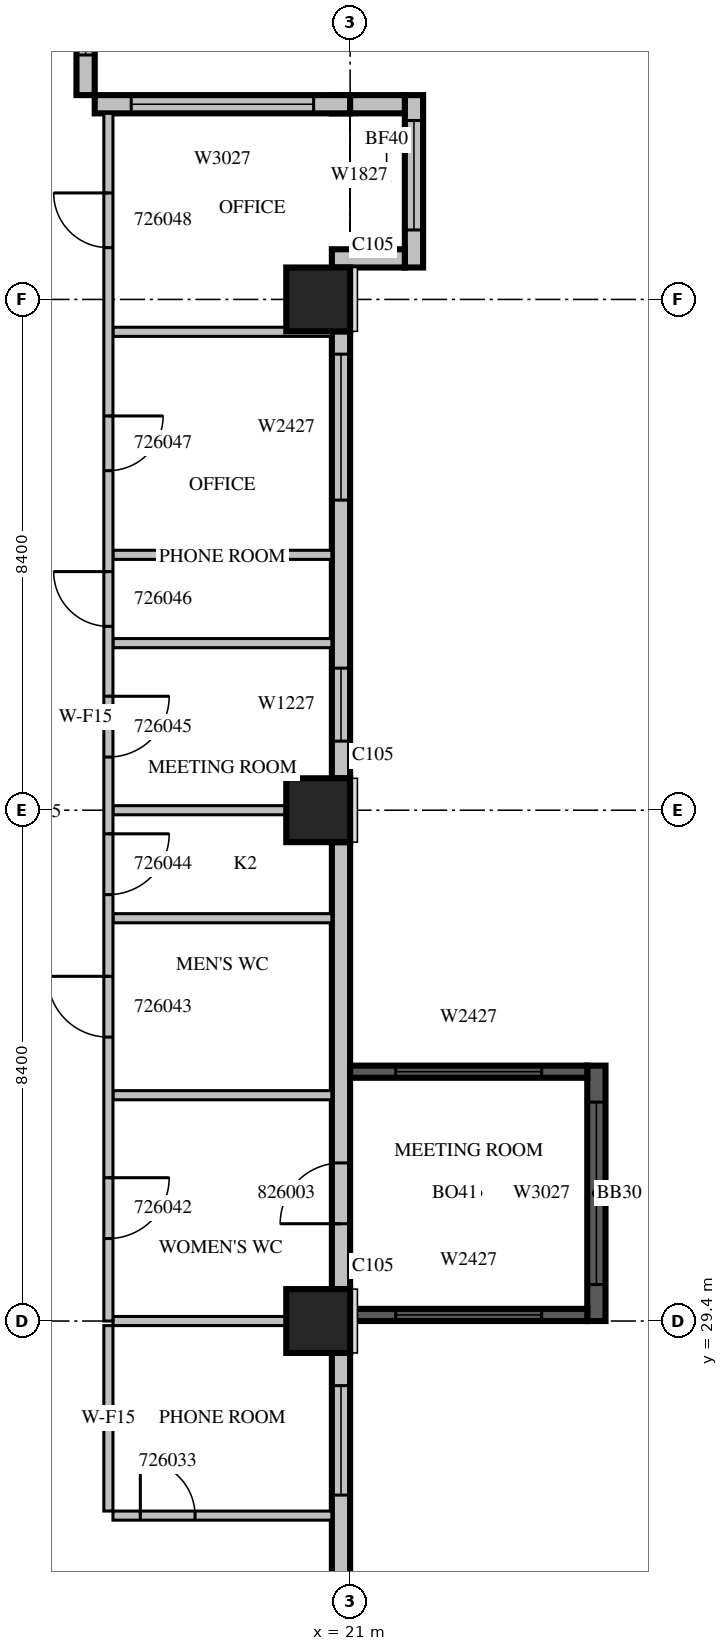
"""IFC4 building model, lengths in metres.
Left out: names, types, materials, properties, quantities, classifications, styles, units other than length and angle.
Written with IfcOpenShell. Run it as: python <this file> out.ifc"""

import sys

from ifc_helpers import new_model, si_unit, direction, frame, frame_2d, origin, origin_2d, place, context, subcontext, project, spatial, rectangle, extrude, source, transform, mapped, element, fill, save


model = new_model("IFC4")
c1 = context("Model", 3, precision=1e-05, world=origin(), true_north=direction((0.0, 1.0)))
c2 = subcontext(c1, "Body", "Model", "MODEL_VIEW")
j1 = project(units=[si_unit("LENGTHUNIT", "METRE"), si_unit("PLANEANGLEUNIT", "RADIAN")], contexts=[c1])
p1 = place(None, origin())
s1 = spatial("IfcSite", under=j1, at=p1, CompositionType="ELEMENT")
p2 = place(p1, origin())
s2 = spatial("IfcBuilding", under=s1, at=p2, CompositionType="ELEMENT")
p3 = place(p2, frame((0.0, 0.0, 120.3)))
s3 = spatial("IfcBuildingStorey", under=s2, at=p3, CompositionType="ELEMENT", Elevation=120.3)
m1 = source(origin(), c2, "Body", "SweptSolid", [
    extrude(rectangle(XDim=1.05, YDim=1.05, at=origin_2d()), origin(), (0.0, 0.0, 1.0), 4.2),
])
for number, where, z_axis, x_axis in (
    (1, (20.475, 29.4, 0.0), (0.0, 0.0, 1.0), (1.0, 0.0, 0.0)),
    (2, (20.475, 37.8, 0.0), (0.0, 0.0, 1.0), (1.0, 0.0, 0.0)),
    (3, (20.475, 46.2, 0.0), (0.0, 0.0, 1.0), (1.0, 0.0, 0.0)),
):
    element("IfcColumn", number, at=place(p3, frame(where, z_axis=z_axis, x_axis=x_axis)), inside=s3, PredefinedType="COLUMN", context=c2, shape_type="MappedRepresentation", body=[
        mapped(m1, transform((0.0, 0.0, 0.0), scale=1.0)),
    ])
m2 = source(origin(), c2, "Body", "SweptSolid", [
    extrude(rectangle(XDim=6.875, YDim=0.3, at=frame_2d((3.438, 0.0))), origin(), (0.0, 0.0, 1.0), 3.8),
])
p4 = place(p3, frame((20.85, 22.0, 0.0), z_axis=(0.0, 0.0, 1.0), x_axis=(0.0, 1.0, 0.0)))
e4 = element("IfcWall", 4, at=p4, inside=s3, PredefinedType="STANDARD", context=c2, shape_type="MappedRepresentation", body=[
    mapped(m2, transform((0.0, 0.0, 0.0), scale=1.0)),
])
m3 = source(origin(), c2, "Body", "SweptSolid", [
    extrude(rectangle(XDim=1.8, YDim=2.7, at=frame_2d((0.9, 1.35))), frame((0.0, 0.16, 0.0), z_axis=(0.0, -1.0, 0.0), x_axis=(1.0, 0.0, 0.0)), (0.0, 0.0, 1.0), 0.32),
])
p5 = place(p4, frame((0.2, 0.0, 0.6)))
e5 = element("IfcOpeningElement", 5, at=p5, cuts=e4, PredefinedType="OPENING", context=c2, shape_type="MappedRepresentation", body=[
    mapped(m3, transform((0.0, 0.0, 0.0), scale=1.0)),
])
p6 = place(p4, frame((4.537, 0.0, 0.6)))
e6 = element("IfcOpeningElement", 6, at=p6, cuts=e4, PredefinedType="OPENING", context=c2, shape_type="MappedRepresentation", body=[
    mapped(m3, transform((0.0, 0.0, 0.0), scale=1.0)),
])
m4 = source(origin(), c2, "Body", "SweptSolid", [
    extrude(rectangle(XDim=7.35, YDim=0.3, at=frame_2d((3.675, 0.0))), origin(), (0.0, 0.0, 1.0), 3.8),
])
p7 = place(p3, frame((20.85, 29.925, 0.0), z_axis=(0.0, 0.0, 1.0), x_axis=(0.0, 1.0, 0.0)))
e7 = element("IfcWall", 7, at=p7, inside=s3, PredefinedType="STANDARD", context=c2, shape_type="MappedRepresentation", body=[
    mapped(m4, transform((0.0, 0.0, 0.0), scale=1.0)),
])
m5 = source(origin(), c2, "Body", "SweptSolid", [
    extrude(rectangle(XDim=1.0, YDim=2.1, at=frame_2d((0.5, 1.05))), frame((0.0, 0.16, 0.0), z_axis=(0.0, -1.0, 0.0), x_axis=(1.0, 0.0, 0.0)), (0.0, 0.0, 1.0), 0.32),
])
p8 = place(p7, frame((1.075, 0.0, 0.0)))
e8 = element("IfcOpeningElement", 8, at=p8, cuts=e7, PredefinedType="OPENING", context=c2, shape_type="MappedRepresentation", body=[
    mapped(m5, transform((0.0, 0.0, 0.0), scale=1.0)),
])
p9 = place(p3, frame((20.85, 38.325, 0.0), z_axis=(0.0, 0.0, 1.0), x_axis=(0.0, 1.0, 0.0)))
e9 = element("IfcWall", 9, at=p9, inside=s3, PredefinedType="STANDARD", context=c2, shape_type="MappedRepresentation", body=[
    mapped(m4, transform((0.0, 0.0, 0.0), scale=1.0)),
])
m6 = source(origin(), c2, "Body", "SweptSolid", [
    extrude(rectangle(XDim=1.2, YDim=2.7, at=frame_2d((0.6, 1.35))), frame((0.0, 0.16, 0.0), z_axis=(0.0, -1.0, 0.0), x_axis=(1.0, 0.0, 0.0)), (0.0, 0.0, 1.0), 0.32),
])
p10 = place(p9, frame((0.612, 0.0, 0.6)))
e10 = element("IfcOpeningElement", 10, at=p10, cuts=e9, PredefinedType="OPENING", context=c2, shape_type="MappedRepresentation", body=[
    mapped(m6, transform((0.0, 0.0, 0.0), scale=1.0)),
])
m7 = source(origin(), c2, "Body", "SweptSolid", [
    extrude(rectangle(XDim=2.4, YDim=2.7, at=frame_2d((1.2, 1.35))), frame((0.0, 0.16, 0.0), z_axis=(0.0, -1.0, 0.0), x_axis=(1.0, 0.0, 0.0)), (0.0, 0.0, 1.0), 0.32),
])
p11 = place(p9, frame((4.575, 0.0, 0.6)))
e11 = element("IfcOpeningElement", 11, at=p11, cuts=e9, PredefinedType="OPENING", context=c2, shape_type="MappedRepresentation", body=[
    mapped(m7, transform((0.0, 0.0, 0.0), scale=1.0)),
])
m8 = source(origin(), c2, "Body", "SweptSolid", [
    extrude(rectangle(XDim=2.835, YDim=0.3, at=frame_2d((1.417, 0.0))), origin(), (0.0, 0.0, 1.0), 3.8),
])
p12 = place(p3, frame((22.05, 46.725, 0.0), z_axis=(0.0, 0.0, 1.0), x_axis=(0.0, 1.0, 0.0)))
e12 = element("IfcWall", 12, at=p12, inside=s3, PredefinedType="STANDARD", context=c2, shape_type="MappedRepresentation", body=[
    mapped(m8, transform((0.0, 0.0, 0.0), scale=1.0)),
])
p13 = place(p12, frame((0.618, 0.0, 0.6)))
e13 = element("IfcOpeningElement", 13, at=p13, cuts=e12, PredefinedType="OPENING", context=c2, shape_type="MappedRepresentation", body=[
    mapped(m3, transform((0.0, 0.0, 0.0), scale=1.0)),
])
m9 = source(origin(), c2, "Body", "SweptSolid", [
    extrude(rectangle(XDim=1.2, YDim=0.3, at=frame_2d((0.6, 0.0))), origin(), (0.0, 0.0, 1.0), 3.8),
])
for number, where, z_axis, x_axis in (
    (14, (20.7, 46.875, 0.0), (0.0, 0.0, 1.0), (1.0, 0.0, 0.0)),
    (15, (20.7, 49.41, 0.0), (0.0, 0.0, 1.0), (1.0, 0.0, 0.0)),
):
    element("IfcWall", number, at=place(p3, frame(where, z_axis=z_axis, x_axis=x_axis)), inside=s3, PredefinedType="STANDARD", context=c2, shape_type="MappedRepresentation", body=[
        mapped(m9, transform((0.0, 0.0, 0.0), scale=1.0)),
    ])
m10 = source(origin(), c2, "Body", "SweptSolid", [
    extrude(rectangle(XDim=4.2, YDim=0.3, at=frame_2d((2.1, 0.0))), origin(), (0.0, 0.0, 1.0), 3.8),
])
p14 = place(p3, frame((21.0, 49.41, 0.0), z_axis=(0.0, 0.0, 1.0), x_axis=(-1.0, 0.0, 0.0)))
e16 = element("IfcWall", 16, at=p14, inside=s3, PredefinedType="STANDARD", context=c2, shape_type="MappedRepresentation", body=[
    mapped(m10, transform((0.0, 0.0, 0.0), scale=1.0)),
])
m11 = source(origin(), c2, "Body", "SweptSolid", [
    extrude(rectangle(XDim=3.0, YDim=2.7, at=frame_2d((1.5, 1.35))), frame((0.0, 0.16, 0.0), z_axis=(0.0, -1.0, 0.0), x_axis=(1.0, 0.0, 0.0)), (0.0, 0.0, 1.0), 0.32),
])
p15 = place(p14, frame((0.6, 0.0, 0.6)))
e17 = element("IfcOpeningElement", 17, at=p15, cuts=e16, PredefinedType="OPENING", context=c2, shape_type="MappedRepresentation", body=[
    mapped(m11, transform((0.0, 0.0, 0.0), scale=1.0)),
])
m12 = source(origin(), c2, "Body", "SweptSolid", [
    extrude(rectangle(XDim=2.52, YDim=0.3, at=frame_2d((1.26, 0.0))), origin(), (0.0, 0.0, 1.0), 3.8),
])
p16 = place(p3, frame((16.65, 49.56, 0.0), z_axis=(0.0, 0.0, 1.0), x_axis=(0.0, 1.0, 0.0)))
e18 = element("IfcWall", 18, at=p16, inside=s3, PredefinedType="STANDARD", context=c2, shape_type="MappedRepresentation", body=[
    mapped(m12, transform((0.0, 0.0, 0.0), scale=1.0)),
])
p17 = place(p16, frame((0.66, 0.0, 0.6)))
e19 = element("IfcOpeningElement", 19, at=p17, cuts=e18, PredefinedType="OPENING", context=c2, shape_type="MappedRepresentation", body=[
    mapped(m6, transform((0.0, 0.0, 0.0), scale=1.0)),
])
m13 = source(origin(), c2, "Body", "SweptSolid", [
    extrude(rectangle(XDim=4.2, YDim=0.3, at=frame_2d((2.1, 0.0))), origin(), (0.0, 0.0, 1.0), 3.79),
])
p18 = place(p3, frame((25.05, 29.4, 0.0), z_axis=(0.0, 0.0, 1.0), x_axis=(0.0, 1.0, 0.0)))
e20 = element("IfcWall", 20, at=p18, inside=s3, PredefinedType="SOLIDWALL", context=c2, shape_type="MappedRepresentation", body=[
    mapped(m13, transform((0.0, 0.0, 0.0), scale=1.0)),
])
p19 = place(p18, frame((0.6, 0.0, 0.6)))
e21 = element("IfcOpeningElement", 21, at=p19, cuts=e20, PredefinedType="OPENING", context=c2, shape_type="MappedRepresentation", body=[
    mapped(m11, transform((0.0, 0.0, 0.0), scale=1.0)),
])
m14 = source(origin(), c2, "Body", "SweptSolid", [
    extrude(rectangle(XDim=3.9, YDim=0.2, at=frame_2d((1.95, 0.0))), origin(), (0.0, 0.0, 1.0), 3.79),
])
p20 = place(p3, frame((21.0, 29.5, 0.0), z_axis=(0.0, 0.0, 1.0), x_axis=(1.0, 0.0, 0.0)))
e22 = element("IfcWall", 22, at=p20, inside=s3, PredefinedType="SOLIDWALL", context=c2, shape_type="MappedRepresentation", body=[
    mapped(m14, transform((0.0, 0.0, 0.0), scale=1.0)),
])
m15 = source(origin(), c2, "Body", "SweptSolid", [
    extrude(rectangle(XDim=2.4, YDim=2.7, at=frame_2d((1.2, 1.35))), frame((0.0, 0.11, 0.0), z_axis=(0.0, -1.0, 0.0), x_axis=(1.0, 0.0, 0.0)), (0.0, 0.0, 1.0), 0.22),
])
p21 = place(p20, frame((0.75, 0.0, 0.6)))
e23 = element("IfcOpeningElement", 23, at=p21, cuts=e22, PredefinedType="OPENING", context=c2, shape_type="MappedRepresentation", body=[
    mapped(m15, transform((0.0, 0.0, 0.0), scale=1.0)),
])
p22 = place(p3, frame((21.0, 33.5, 0.0), z_axis=(0.0, 0.0, 1.0), x_axis=(1.0, 0.0, 0.0)))
e24 = element("IfcWall", 24, at=p22, inside=s3, PredefinedType="SOLIDWALL", context=c2, shape_type="MappedRepresentation", body=[
    mapped(m14, transform((0.0, 0.0, 0.0), scale=1.0)),
])
p23 = place(p22, frame((0.75, 0.0, 0.6)))
e25 = element("IfcOpeningElement", 25, at=p23, cuts=e24, PredefinedType="OPENING", context=c2, shape_type="MappedRepresentation", body=[
    mapped(m15, transform((0.0, 0.0, 0.0), scale=1.0)),
])
m16 = source(origin(), c2, "Body", "SweptSolid", [
    extrude(rectangle(XDim=3.6, YDim=0.15, at=frame_2d((1.8, 0.0))), origin(), (0.0, 0.0, 1.0), 3.8),
])
p24 = place(p3, frame((17.1, 26.2, 0.0), z_axis=(0.0, 0.0, 1.0), x_axis=(1.0, 0.0, 0.0)))
e26 = element("IfcWall", 26, at=p24, inside=s3, PredefinedType="PARTITIONING", context=c2, shape_type="MappedRepresentation", body=[
    mapped(m16, transform((0.0, 0.0, 0.0), scale=1.0)),
])
m17 = source(origin(), c2, "Body", "SweptSolid", [
    extrude(rectangle(XDim=0.9, YDim=2.1, at=frame_2d((0.45, 1.05))), frame((0.0, 0.085, 0.0), z_axis=(0.0, -1.0, 0.0), x_axis=(1.0, 0.0, 0.0)), (0.0, 0.0, 1.0), 0.17),
])
p25 = place(p24, frame((0.45, 0.0, 0.0)))
e27 = element("IfcOpeningElement", 27, at=p25, cuts=e26, PredefinedType="OPENING", context=c2, shape_type="MappedRepresentation", body=[
    mapped(m17, transform((0.0, 0.0, 0.0), scale=1.0)),
])
m18 = source(origin(), c2, "Body", "SweptSolid", [
    extrude(rectangle(XDim=3.05, YDim=0.15, at=frame_2d((1.525, 0.0))), origin(), (0.0, 0.0, 1.0), 3.8),
])
p26 = place(p3, frame((17.025, 29.325, 0.0), z_axis=(0.0, 0.0, 1.0), x_axis=(0.0, -1.0, 0.0)))
e28 = element("IfcWall", 28, at=p26, inside=s3, PredefinedType="PARTITIONING", context=c2, shape_type="MappedRepresentation", body=[
    mapped(m18, transform((0.0, 0.0, 0.0), scale=1.0)),
])
m19 = source(origin(), c2, "Body", "SweptSolid", [
    extrude(rectangle(XDim=2.851, YDim=0.15, at=frame_2d((1.425, 0.0))), origin(), (0.0, 0.0, 1.0), 3.8),
])
p27 = place(p3, frame((19.951, 29.4, 0.0), z_axis=(0.0, 0.0, 1.0), x_axis=(-1.0, 0.0, 0.0)))
e29 = element("IfcWall", 29, at=p27, inside=s3, PredefinedType="PARTITIONING", context=c2, shape_type="MappedRepresentation", body=[
    mapped(m19, transform((0.0, 0.0, 0.0), scale=1.0)),
])
for number, where, z_axis, x_axis in (
    (30, (17.1, 33.113, 0.0), (0.0, 0.0, 1.0), (1.0, 0.0, 0.0)),
    (31, (17.1, 36.024, 0.0), (0.0, 0.0, 1.0), (1.0, 0.0, 0.0)),
    (32, (17.1, 40.548, 0.0), (0.0, 0.0, 1.0), (1.0, 0.0, 0.0)),
    (33, (17.1, 45.667, 0.0), (0.0, 0.0, 1.0), (1.0, 0.0, 0.0)),
):
    element("IfcWall", number, at=place(p3, frame(where, z_axis=z_axis, x_axis=x_axis)), inside=s3, PredefinedType="PARTITIONING", context=c2, shape_type="MappedRepresentation", body=[
        mapped(m16, transform((0.0, 0.0, 0.0), scale=1.0)),
    ])
p28 = place(p3, frame((19.951, 37.8, 0.0), z_axis=(0.0, 0.0, 1.0), x_axis=(-1.0, 0.0, 0.0)))
e34 = element("IfcWall", 34, at=p28, inside=s3, PredefinedType="PARTITIONING", context=c2, shape_type="MappedRepresentation", body=[
    mapped(m19, transform((0.0, 0.0, 0.0), scale=1.0)),
])
p29 = place(p3, frame((20.7, 42.0, 0.0), z_axis=(0.0, 0.0, 1.0), x_axis=(-1.0, 0.0, 0.0)))
e35 = element("IfcWall", 35, at=p29, inside=s3, PredefinedType="PARTITIONING", context=c2, shape_type="MappedRepresentation", body=[
    mapped(m16, transform((0.0, 0.0, 0.0), scale=1.0)),
])
m20 = source(origin(), c2, "Body", "SweptSolid", [
    extrude(rectangle(XDim=19.86, YDim=0.15, at=frame_2d((9.93, 0.0))), origin(), (0.0, 0.0, 1.0), 3.8),
])
p30 = place(p3, frame((17.025, 49.26, 0.0), z_axis=(0.0, 0.0, 1.0), x_axis=(0.0, -1.0, 0.0)))
e36 = element("IfcWall", 36, at=p30, inside=s3, PredefinedType="PARTITIONING", context=c2, shape_type="MappedRepresentation", body=[
    mapped(m20, transform((0.0, 0.0, 0.0), scale=1.0)),
])
m21 = source(origin(), c2, "Body", "SweptSolid", [
    extrude(rectangle(XDim=1.0, YDim=2.1, at=frame_2d((0.5, 1.05))), frame((0.0, 0.085, 0.0), z_axis=(0.0, -1.0, 0.0), x_axis=(1.0, 0.0, 0.0)), (0.0, 0.0, 1.0), 0.17),
])
p31 = place(p30, frame((17.503, 0.0, 0.0)))
e37 = element("IfcOpeningElement", 37, at=p31, cuts=e36, PredefinedType="OPENING", context=c2, shape_type="MappedRepresentation", body=[
    mapped(m21, transform((0.0, 0.0, 0.0), scale=1.0)),
])
p32 = place(p30, frame((14.191, 0.0, 0.0)))
e38 = element("IfcOpeningElement", 38, at=p32, cuts=e36, PredefinedType="OPENING", context=c2, shape_type="MappedRepresentation", body=[
    mapped(m21, transform((0.0, 0.0, 0.0), scale=1.0)),
])
p33 = place(p30, frame((11.848, 0.0, 0.0)))
e39 = element("IfcOpeningElement", 39, at=p33, cuts=e36, PredefinedType="OPENING", context=c2, shape_type="MappedRepresentation", body=[
    mapped(m21, transform((0.0, 0.0, 0.0), scale=1.0)),
])
p34 = place(p30, frame((9.586, 0.0, 0.0)))
e40 = element("IfcOpeningElement", 40, at=p34, cuts=e36, PredefinedType="OPENING", context=c2, shape_type="MappedRepresentation", body=[
    mapped(m21, transform((0.0, 0.0, 0.0), scale=1.0)),
])
p35 = place(p30, frame((7.536, 0.0, 0.0)))
e41 = element("IfcOpeningElement", 41, at=p35, cuts=e36, PredefinedType="OPENING", context=c2, shape_type="MappedRepresentation", body=[
    mapped(m17, transform((0.0, 0.0, 0.0), scale=1.0)),
])
p36 = place(p30, frame((4.976, 0.0, 0.0)))
e42 = element("IfcOpeningElement", 42, at=p36, cuts=e36, PredefinedType="OPENING", context=c2, shape_type="MappedRepresentation", body=[
    mapped(m17, transform((0.0, 0.0, 0.0), scale=1.0)),
])
p37 = place(p30, frame((1.309, 0.0, 0.0)))
e43 = element("IfcOpeningElement", 43, at=p37, cuts=e36, PredefinedType="OPENING", context=c2, shape_type="MappedRepresentation", body=[
    mapped(m17, transform((0.0, 0.0, 0.0), scale=1.0)),
])
m22 = source(origin(), c2, "Body", "SweptSolid", [
    extrude(rectangle(XDim=1.8, YDim=2.7, at=frame_2d((0.9, 1.35))), frame((0.0, 0.03, 0.0), z_axis=(0.0, -1.0, 0.0), x_axis=(1.0, 0.0, 0.0)), (0.0, 0.0, 1.0), 0.06),
])
p38 = place(p6, origin())
e44 = element("IfcWindow", 44, at=p38, inside=s3, PartitioningType="SINGLE_PANEL", PredefinedType="WINDOW", context=c2, shape_type="MappedRepresentation", body=[
    mapped(m22, transform((0.0, 0.0, 0.0), scale=1.0)),
])
fill(e6, e44)
m23 = source(origin(), c2, "Body", "SweptSolid", [
    extrude(rectangle(XDim=1.2, YDim=2.7, at=frame_2d((0.6, 1.35))), frame((0.0, 0.03, 0.0), z_axis=(0.0, -1.0, 0.0), x_axis=(1.0, 0.0, 0.0)), (0.0, 0.0, 1.0), 0.06),
])
p39 = place(p10, origin())
e45 = element("IfcWindow", 45, at=p39, inside=s3, PartitioningType="SINGLE_PANEL", PredefinedType="WINDOW", context=c2, shape_type="MappedRepresentation", body=[
    mapped(m23, transform((0.0, 0.0, 0.0), scale=1.0)),
])
fill(e10, e45)
m24 = source(origin(), c2, "Body", "SweptSolid", [
    extrude(rectangle(XDim=2.4, YDim=2.7, at=frame_2d((1.2, 1.35))), frame((0.0, 0.03, 0.0), z_axis=(0.0, -1.0, 0.0), x_axis=(1.0, 0.0, 0.0)), (0.0, 0.0, 1.0), 0.06),
])
p40 = place(p11, origin())
e46 = element("IfcWindow", 46, at=p40, inside=s3, PartitioningType="SINGLE_PANEL", PredefinedType="WINDOW", context=c2, shape_type="MappedRepresentation", body=[
    mapped(m24, transform((0.0, 0.0, 0.0), scale=1.0)),
])
fill(e11, e46)
p41 = place(p13, origin())
e47 = element("IfcWindow", 47, at=p41, inside=s3, PartitioningType="SINGLE_PANEL", PredefinedType="WINDOW", context=c2, shape_type="MappedRepresentation", body=[
    mapped(m22, transform((0.0, 0.0, 0.0), scale=1.0)),
])
fill(e13, e47)
m25 = source(origin(), c2, "Body", "SweptSolid", [
    extrude(rectangle(XDim=3.0, YDim=2.7, at=frame_2d((1.5, 1.35))), frame((0.0, 0.03, 0.0), z_axis=(0.0, -1.0, 0.0), x_axis=(1.0, 0.0, 0.0)), (0.0, 0.0, 1.0), 0.06),
])
p42 = place(p15, origin())
e48 = element("IfcWindow", 48, at=p42, inside=s3, PartitioningType="SINGLE_PANEL", PredefinedType="WINDOW", context=c2, shape_type="MappedRepresentation", body=[
    mapped(m25, transform((0.0, 0.0, 0.0), scale=1.0)),
])
fill(e17, e48)
p43 = place(p17, origin())
e49 = element("IfcWindow", 49, at=p43, inside=s3, PartitioningType="SINGLE_PANEL", PredefinedType="WINDOW", context=c2, shape_type="MappedRepresentation", body=[
    mapped(m23, transform((0.0, 0.0, 0.0), scale=1.0)),
])
fill(e19, e49)
p44 = place(p19, origin())
e50 = element("IfcWindow", 50, at=p44, inside=s3, PartitioningType="SINGLE_PANEL", PredefinedType="WINDOW", context=c2, shape_type="MappedRepresentation", body=[
    mapped(m25, transform((0.0, 0.0, 0.0), scale=1.0)),
])
fill(e21, e50)
p45 = place(p21, origin())
e51 = element("IfcWindow", 51, at=p45, inside=s3, PartitioningType="SINGLE_PANEL", PredefinedType="WINDOW", context=c2, shape_type="MappedRepresentation", body=[
    mapped(m24, transform((0.0, 0.0, 0.0), scale=1.0)),
])
fill(e23, e51)
p46 = place(p23, origin())
e52 = element("IfcWindow", 52, at=p46, inside=s3, PartitioningType="SINGLE_PANEL", PredefinedType="WINDOW", context=c2, shape_type="MappedRepresentation", body=[
    mapped(m24, transform((0.0, 0.0, 0.0), scale=1.0)),
])
fill(e25, e52)
m26 = source(origin(), c2, "Body", "SweptSolid", [
    extrude(rectangle(XDim=0.9, YDim=2.1, at=frame_2d((0.45, 1.05))), frame((0.0, 0.025, 0.0), z_axis=(0.0, -1.0, 0.0), x_axis=(1.0, 0.0, 0.0)), (0.0, 0.0, 1.0), 0.05),
])
p47 = place(p25, origin())
e53 = element("IfcDoor", 53, at=p47, inside=s3, OperationType="SINGLE_SWING_LEFT", PredefinedType="DOOR", context=c2, shape_type="MappedRepresentation", body=[
    mapped(m26, transform((0.0, 0.0, 0.0), scale=1.0)),
])
fill(e27, e53)
m27 = source(origin(), c2, "Body", "SweptSolid", [
    extrude(rectangle(XDim=1.0, YDim=2.1, at=frame_2d((0.5, 1.05))), frame((0.0, 0.025, 0.0), z_axis=(0.0, -1.0, 0.0), x_axis=(1.0, 0.0, 0.0)), (0.0, 0.0, 1.0), 0.05),
])
p48 = place(p31, origin())
e54 = element("IfcDoor", 54, at=p48, inside=s3, OperationType="SINGLE_SWING_LEFT", PredefinedType="DOOR", context=c2, shape_type="MappedRepresentation", body=[
    mapped(m27, transform((0.0, 0.0, 0.0), scale=1.0)),
])
fill(e37, e54)
p49 = place(p32, origin())
e55 = element("IfcDoor", 55, at=p49, inside=s3, OperationType="SINGLE_SWING_RIGHT", PredefinedType="DOOR", context=c2, shape_type="MappedRepresentation", body=[
    mapped(m27, transform((0.0, 0.0, 0.0), scale=1.0)),
])
fill(e38, e55)
p50 = place(p33, origin())
e56 = element("IfcDoor", 56, at=p50, inside=s3, OperationType="SINGLE_SWING_LEFT", PredefinedType="DOOR", context=c2, shape_type="MappedRepresentation", body=[
    mapped(m27, transform((0.0, 0.0, 0.0), scale=1.0)),
])
fill(e39, e56)
p51 = place(p34, origin())
e57 = element("IfcDoor", 57, at=p51, inside=s3, OperationType="SINGLE_SWING_LEFT", PredefinedType="DOOR", context=c2, shape_type="MappedRepresentation", body=[
    mapped(m27, transform((0.0, 0.0, 0.0), scale=1.0)),
])
fill(e40, e57)
p52 = place(p35, origin())
e58 = element("IfcDoor", 58, at=p52, inside=s3, OperationType="SINGLE_SWING_RIGHT", PredefinedType="DOOR", context=c2, shape_type="MappedRepresentation", body=[
    mapped(m26, transform((0.0, 0.0, 0.0), scale=1.0)),
])
fill(e41, e58)
p53 = place(p36, origin())
e59 = element("IfcDoor", 59, at=p53, inside=s3, OperationType="SINGLE_SWING_LEFT", PredefinedType="DOOR", context=c2, shape_type="MappedRepresentation", body=[
    mapped(m26, transform((0.0, 0.0, 0.0), scale=1.0)),
])
fill(e42, e59)
p54 = place(p37, origin())
e60 = element("IfcDoor", 60, at=p54, inside=s3, OperationType="SINGLE_SWING_RIGHT", PredefinedType="DOOR", context=c2, shape_type="MappedRepresentation", body=[
    mapped(m26, transform((0.0, 0.0, 0.0), scale=1.0)),
])
fill(e43, e60)
p55 = place(p8, origin())
e61 = element("IfcDoor", 61, at=p55, inside=s3, OperationType="SINGLE_SWING_LEFT", PredefinedType="DOOR", context=c2, shape_type="MappedRepresentation", body=[
    mapped(m27, transform((0.0, 0.0, 0.0), scale=1.0)),
])
fill(e8, e61)
save(model, sys.argv[1])
